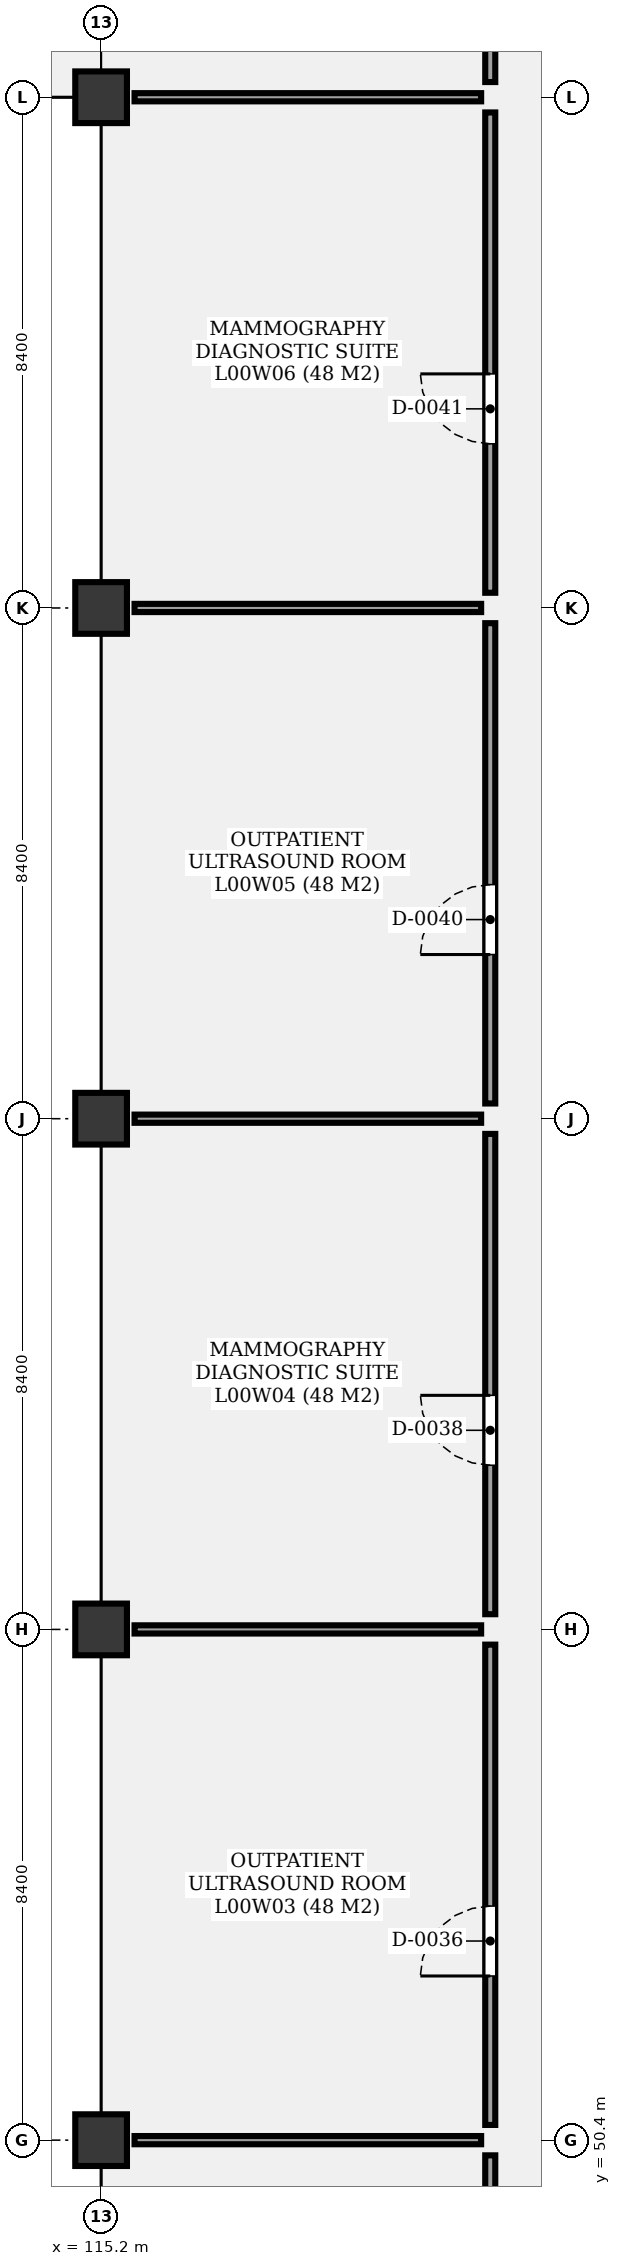
"""IFC4 building model, lengths in metres.
Left out: names, types, materials, properties, quantities, classifications, styles, units other than length and angle.
Written with IfcOpenShell. Run it as: python <this file> out.ifc"""

import sys

from ifc_helpers import new_model, si_unit, direction, frame, frame_2d, origin, origin_2d, place, context, subcontext, project, spatial, rectangle, extrude, element, fill, save


model = new_model("IFC4")
c1 = context("Model", 3, precision=1e-05, world=origin(), true_north=direction((0.0, 1.0)))
c2 = subcontext(c1, "Body", "Model", "MODEL_VIEW")
j1 = project(units=[si_unit("LENGTHUNIT", "METRE"), si_unit("PLANEANGLEUNIT", "RADIAN")], contexts=[c1])
p1 = place(None, origin())
s1 = spatial("IfcSite", under=j1, at=p1, CompositionType="ELEMENT")
p2 = place(p1, origin())
s2 = spatial("IfcBuilding", under=s1, at=p2, CompositionType="ELEMENT")
p3 = place(p2, origin())
s3 = spatial("IfcBuildingStorey", under=s2, at=p3, CompositionType="ELEMENT", Elevation=0.0)
for number, where, z_axis, x_axis in (
    (1, (115.2, 50.4, -0.35), (0.0, 0.0, 1.0), (1.0, 0.0, 0.0)),
    (2, (115.2, 58.8, -0.35), (0.0, 0.0, 1.0), (1.0, 0.0, 0.0)),
    (3, (115.2, 67.2, -0.35), (0.0, 0.0, 1.0), (1.0, 0.0, 0.0)),
    (4, (115.2, 75.6, -0.35), (0.0, 0.0, 1.0), (1.0, 0.0, 0.0)),
    (5, (115.2, 84.0, -0.35), (0.0, 0.0, 1.0), (1.0, 0.0, 0.0)),
):
    element("IfcColumn", number, at=place(p3, frame(where, z_axis=z_axis, x_axis=x_axis)), inside=s3, PredefinedType="COLUMN", context=c2, shape_type="SweptSolid", body=[
        extrude(rectangle(XDim=0.85, YDim=0.85, at=origin_2d()), origin(), (0.0, 0.0, 1.0), 5.45),
    ])
p4 = place(p3, frame((121.6, 42.25, 0.0), z_axis=(0.0, 0.0, 1.0), x_axis=(0.0, 1.0, 0.0)))
e6 = element("IfcWall", 6, at=p4, inside=s3, PredefinedType="PARTITIONING", context=c2, shape_type="SweptSolid", body=[
    extrude(rectangle(XDim=7.9, YDim=0.165, at=frame_2d((3.95, 0.0))), origin(), (0.0, 0.0, 1.0), 3.98),
])
p5 = place(p4, frame((2.45, 0.0, 0.0)))
e7 = element("IfcOpeningElement", 7, at=p5, cuts=e6, PredefinedType="OPENING", context=c2, shape_type="SweptSolid", body=[
    extrude(rectangle(XDim=1.15, YDim=2.2, at=frame_2d((0.575, 1.1))), frame((0.0, 0.093, 0.0), z_axis=(0.0, -1.0, 0.0), x_axis=(1.0, 0.0, 0.0)), (0.0, 0.0, 1.0), 0.185),
])
p6 = place(p3, frame((121.6, 50.65, 0.0), z_axis=(0.0, 0.0, 1.0), x_axis=(0.0, 1.0, 0.0)))
e8 = element("IfcWall", 8, at=p6, inside=s3, PredefinedType="PARTITIONING", context=c2, shape_type="SweptSolid", body=[
    extrude(rectangle(XDim=7.9, YDim=0.165, at=frame_2d((3.95, 0.0))), origin(), (0.0, 0.0, 1.0), 3.98),
])
p7 = place(p6, frame((2.45, 0.0, 0.0)))
e9 = element("IfcOpeningElement", 9, at=p7, cuts=e8, PredefinedType="OPENING", context=c2, shape_type="SweptSolid", body=[
    extrude(rectangle(XDim=1.15, YDim=2.2, at=frame_2d((0.575, 1.1))), frame((0.0, 0.093, 0.0), z_axis=(0.0, -1.0, 0.0), x_axis=(1.0, 0.0, 0.0)), (0.0, 0.0, 1.0), 0.185),
])
p8 = place(p3, frame((115.75, 50.4, 0.0), z_axis=(0.0, 0.0, 1.0), x_axis=(1.0, 0.0, 0.0)))
e10 = element("IfcWall", 10, at=p8, inside=s3, PredefinedType="PARTITIONING", context=c2, shape_type="SweptSolid", body=[
    extrude(rectangle(XDim=5.7, YDim=0.135, at=frame_2d((2.85, 0.0))), origin(), (0.0, 0.0, 1.0), 3.98),
])
p9 = place(p3, frame((121.6, 59.05, 0.0), z_axis=(0.0, 0.0, 1.0), x_axis=(0.0, 1.0, 0.0)))
e11 = element("IfcWall", 11, at=p9, inside=s3, PredefinedType="PARTITIONING", context=c2, shape_type="SweptSolid", body=[
    extrude(rectangle(XDim=7.9, YDim=0.165, at=frame_2d((3.95, 0.0))), origin(), (0.0, 0.0, 1.0), 3.98),
])
p10 = place(p9, frame((2.45, 0.0, 0.0)))
e12 = element("IfcOpeningElement", 12, at=p10, cuts=e11, PredefinedType="OPENING", context=c2, shape_type="SweptSolid", body=[
    extrude(rectangle(XDim=1.15, YDim=2.2, at=frame_2d((0.575, 1.1))), frame((0.0, 0.093, 0.0), z_axis=(0.0, -1.0, 0.0), x_axis=(1.0, 0.0, 0.0)), (0.0, 0.0, 1.0), 0.185),
])
p11 = place(p3, frame((115.75, 58.8, 0.0), z_axis=(0.0, 0.0, 1.0), x_axis=(1.0, 0.0, 0.0)))
e13 = element("IfcWall", 13, at=p11, inside=s3, PredefinedType="PARTITIONING", context=c2, shape_type="SweptSolid", body=[
    extrude(rectangle(XDim=5.7, YDim=0.135, at=frame_2d((2.85, 0.0))), origin(), (0.0, 0.0, 1.0), 3.98),
])
p12 = place(p3, frame((121.6, 67.45, 0.0), z_axis=(0.0, 0.0, 1.0), x_axis=(0.0, 1.0, 0.0)))
e14 = element("IfcWall", 14, at=p12, inside=s3, PredefinedType="PARTITIONING", context=c2, shape_type="SweptSolid", body=[
    extrude(rectangle(XDim=7.9, YDim=0.165, at=frame_2d((3.95, 0.0))), origin(), (0.0, 0.0, 1.0), 3.98),
])
p13 = place(p12, frame((2.45, 0.0, 0.0)))
e15 = element("IfcOpeningElement", 15, at=p13, cuts=e14, PredefinedType="OPENING", context=c2, shape_type="SweptSolid", body=[
    extrude(rectangle(XDim=1.15, YDim=2.2, at=frame_2d((0.575, 1.1))), frame((0.0, 0.093, 0.0), z_axis=(0.0, -1.0, 0.0), x_axis=(1.0, 0.0, 0.0)), (0.0, 0.0, 1.0), 0.185),
])
p14 = place(p3, frame((115.75, 67.2, 0.0), z_axis=(0.0, 0.0, 1.0), x_axis=(1.0, 0.0, 0.0)))
e16 = element("IfcWall", 16, at=p14, inside=s3, PredefinedType="PARTITIONING", context=c2, shape_type="SweptSolid", body=[
    extrude(rectangle(XDim=5.7, YDim=0.135, at=frame_2d((2.85, 0.0))), origin(), (0.0, 0.0, 1.0), 3.98),
])
p15 = place(p3, frame((121.6, 75.85, 0.0), z_axis=(0.0, 0.0, 1.0), x_axis=(0.0, 1.0, 0.0)))
e17 = element("IfcWall", 17, at=p15, inside=s3, PredefinedType="PARTITIONING", context=c2, shape_type="SweptSolid", body=[
    extrude(rectangle(XDim=7.9, YDim=0.165, at=frame_2d((3.95, 0.0))), origin(), (0.0, 0.0, 1.0), 3.98),
])
p16 = place(p15, frame((2.45, 0.0, 0.0)))
e18 = element("IfcOpeningElement", 18, at=p16, cuts=e17, PredefinedType="OPENING", context=c2, shape_type="SweptSolid", body=[
    extrude(rectangle(XDim=1.15, YDim=2.2, at=frame_2d((0.575, 1.1))), frame((0.0, 0.093, 0.0), z_axis=(0.0, -1.0, 0.0), x_axis=(1.0, 0.0, 0.0)), (0.0, 0.0, 1.0), 0.185),
])
p17 = place(p3, frame((115.75, 75.6, 0.0), z_axis=(0.0, 0.0, 1.0), x_axis=(1.0, 0.0, 0.0)))
e19 = element("IfcWall", 19, at=p17, inside=s3, PredefinedType="PARTITIONING", context=c2, shape_type="SweptSolid", body=[
    extrude(rectangle(XDim=5.7, YDim=0.135, at=frame_2d((2.85, 0.0))), origin(), (0.0, 0.0, 1.0), 3.98),
])
p18 = place(p3, frame((121.6, 84.25, 0.0), z_axis=(0.0, 0.0, 1.0), x_axis=(0.0, 1.0, 0.0)))
e20 = element("IfcWall", 20, at=p18, inside=s3, PredefinedType="PARTITIONING", context=c2, shape_type="SweptSolid", body=[
    extrude(rectangle(XDim=7.9, YDim=0.165, at=frame_2d((3.95, 0.0))), origin(), (0.0, 0.0, 1.0), 3.98),
])
p19 = place(p18, frame((2.45, 0.0, 0.0)))
e21 = element("IfcOpeningElement", 21, at=p19, cuts=e20, PredefinedType="OPENING", context=c2, shape_type="SweptSolid", body=[
    extrude(rectangle(XDim=1.15, YDim=2.2, at=frame_2d((0.575, 1.1))), frame((0.0, 0.093, 0.0), z_axis=(0.0, -1.0, 0.0), x_axis=(1.0, 0.0, 0.0)), (0.0, 0.0, 1.0), 0.185),
])
p20 = place(p3, frame((115.75, 84.0, 0.0), z_axis=(0.0, 0.0, 1.0), x_axis=(1.0, 0.0, 0.0)))
e22 = element("IfcWall", 22, at=p20, inside=s3, PredefinedType="PARTITIONING", context=c2, shape_type="SweptSolid", body=[
    extrude(rectangle(XDim=5.7, YDim=0.135, at=frame_2d((2.85, 0.0))), origin(), (0.0, 0.0, 1.0), 3.98),
])
p21 = place(p7, origin())
e23 = element("IfcDoor", 23, at=p21, inside=s3, OperationType="SINGLE_SWING_LEFT", PredefinedType="DOOR", context=c2, shape_type="SweptSolid", body=[
    extrude(rectangle(XDim=1.15, YDim=2.2, at=frame_2d((0.575, 1.1))), frame((0.0, 0.025, 0.0), z_axis=(0.0, -1.0, 0.0), x_axis=(1.0, 0.0, 0.0)), (0.0, 0.0, 1.0), 0.05),
])
fill(e9, e23)
p22 = place(p10, origin())
e24 = element("IfcDoor", 24, at=p22, inside=s3, OperationType="SINGLE_SWING_RIGHT", PredefinedType="DOOR", context=c2, shape_type="SweptSolid", body=[
    extrude(rectangle(XDim=1.15, YDim=2.2, at=frame_2d((0.575, 1.1))), frame((0.0, 0.025, 0.0), z_axis=(0.0, -1.0, 0.0), x_axis=(1.0, 0.0, 0.0)), (0.0, 0.0, 1.0), 0.05),
])
fill(e12, e24)
p23 = place(p13, origin())
e25 = element("IfcDoor", 25, at=p23, inside=s3, OperationType="SINGLE_SWING_LEFT", PredefinedType="DOOR", context=c2, shape_type="SweptSolid", body=[
    extrude(rectangle(XDim=1.15, YDim=2.2, at=frame_2d((0.575, 1.1))), frame((0.0, 0.025, 0.0), z_axis=(0.0, -1.0, 0.0), x_axis=(1.0, 0.0, 0.0)), (0.0, 0.0, 1.0), 0.05),
])
fill(e15, e25)
p24 = place(p16, origin())
e26 = element("IfcDoor", 26, at=p24, inside=s3, OperationType="SINGLE_SWING_RIGHT", PredefinedType="DOOR", context=c2, shape_type="SweptSolid", body=[
    extrude(rectangle(XDim=1.15, YDim=2.2, at=frame_2d((0.575, 1.1))), frame((0.0, 0.025, 0.0), z_axis=(0.0, -1.0, 0.0), x_axis=(1.0, 0.0, 0.0)), (0.0, 0.0, 1.0), 0.05),
])
fill(e18, e26)
save(model, sys.argv[1])
